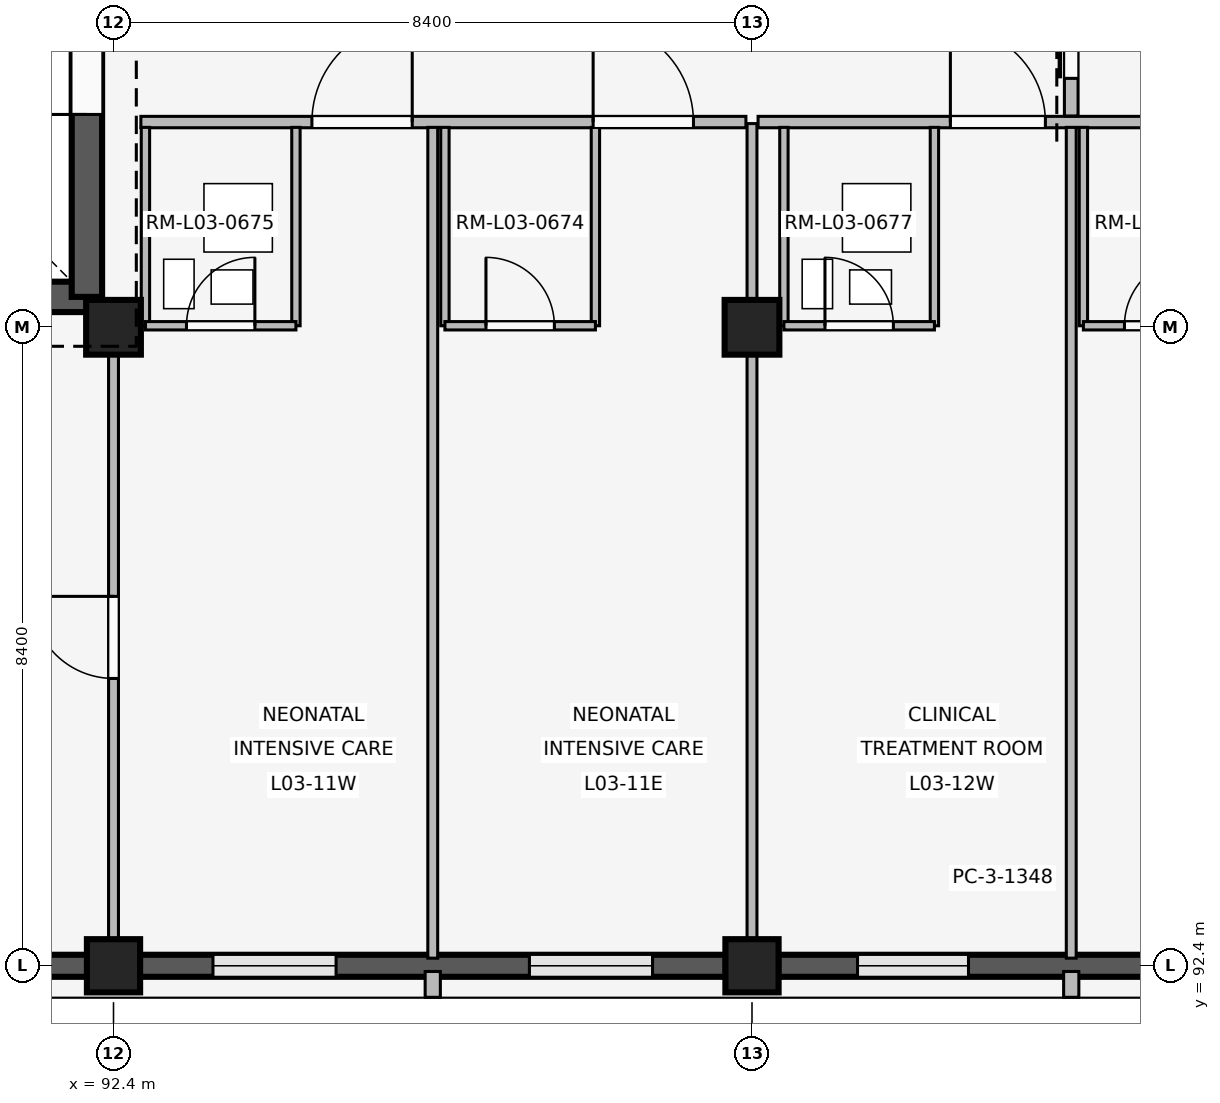
"""IFC4 building model, lengths in metres.
Left out: names, types, materials, properties, quantities, classifications, styles, units other than length and angle.
Written with IfcOpenShell. Run it as: python <this file> out.ifc"""

import sys

from ifc_helpers import new_model, si_unit, direction, frame, frame_2d, origin, origin_2d, place, context, subcontext, project, spatial, rectangle, extrude, element, fill, save


model = new_model("IFC4")
c1 = context("Model", 3, precision=1e-05, world=origin(), true_north=direction((0.0, 1.0)))
c2 = subcontext(c1, "Body", "Model", "MODEL_VIEW")
j1 = project(units=[si_unit("LENGTHUNIT", "METRE"), si_unit("PLANEANGLEUNIT", "RADIAN")], contexts=[c1])
p1 = place(None, origin())
s1 = spatial("IfcSite", under=j1, at=p1, CompositionType="ELEMENT")
p2 = place(p1, origin())
s2 = spatial("IfcBuilding", under=s1, at=p2, CompositionType="ELEMENT")
p3 = place(p2, frame((0.0, 0.0, 12.9)))
s3 = spatial("IfcBuildingStorey", under=s2, at=p3, CompositionType="ELEMENT", Elevation=12.9)
p4 = place(p3, frame((92.4, 92.4, 0.0), z_axis=(0.0, 0.0, 1.0), x_axis=(1.0, 0.0, 0.0)))
e1 = element("IfcColumn", 1, at=p4, inside=s3, PredefinedType="COLUMN", context=c2, shape_type="SweptSolid", body=[
    extrude(rectangle(XDim=0.7, YDim=0.7, at=origin_2d()), origin(), (0.0, 0.0, 1.0), 3.3),
])
p5 = place(p3, frame((92.4, 100.8, 0.0), z_axis=(0.0, 0.0, 1.0), x_axis=(1.0, 0.0, 0.0)))
e2 = element("IfcColumn", 2, at=p5, inside=s3, PredefinedType="COLUMN", context=c2, shape_type="SweptSolid", body=[
    extrude(rectangle(XDim=0.72, YDim=0.72, at=origin_2d()), origin(), (0.0, 0.0, 1.0), 3.3),
])
p6 = place(p3, frame((100.8, 92.4, 0.0), z_axis=(0.0, 0.0, 1.0), x_axis=(1.0, 0.0, 0.0)))
e3 = element("IfcColumn", 3, at=p6, inside=s3, PredefinedType="COLUMN", context=c2, shape_type="SweptSolid", body=[
    extrude(rectangle(XDim=0.7, YDim=0.7, at=origin_2d()), origin(), (0.0, 0.0, 1.0), 3.3),
])
p7 = place(p3, frame((100.8, 100.8, 0.0), z_axis=(0.0, 0.0, 1.0), x_axis=(1.0, 0.0, 0.0)))
e4 = element("IfcColumn", 4, at=p7, inside=s3, PredefinedType="COLUMN", context=c2, shape_type="SweptSolid", body=[
    extrude(rectangle(XDim=0.72, YDim=0.72, at=origin_2d()), origin(), (0.0, 0.0, 1.0), 3.3),
])
p8 = place(p3, frame((92.055, 92.4, 0.0), z_axis=(0.0, 0.0, 1.0), x_axis=(-1.0, 0.0, 0.0)))
e5 = element("IfcWall", 5, at=p8, inside=s3, PredefinedType="SOLIDWALL", context=c2, shape_type="SweptSolid", body=[
    extrude(rectangle(XDim=7.71, YDim=0.29, at=frame_2d((3.855, 0.0))), origin(), (0.0, 0.0, 1.0), 2.44),
])
p9 = place(p8, frame((1.043, 0.0, 0.85)))
e6 = element("IfcOpeningElement", 6, at=p9, cuts=e5, PredefinedType="OPENING", context=c2, shape_type="SweptSolid", body=[
    extrude(rectangle(XDim=1.46, YDim=0.85, at=frame_2d((0.73, 0.425))), frame((0.0, 0.155, 0.0), z_axis=(0.0, -1.0, 0.0), x_axis=(1.0, 0.0, 0.0)), (0.0, 0.0, 1.0), 0.31),
])
p10 = place(p8, frame((5.207, 0.0, 0.85)))
e7 = element("IfcOpeningElement", 7, at=p10, cuts=e5, PredefinedType="OPENING", context=c2, shape_type="SweptSolid", body=[
    extrude(rectangle(XDim=1.46, YDim=0.85, at=frame_2d((0.73, 0.425))), frame((0.0, 0.155, 0.0), z_axis=(0.0, -1.0, 0.0), x_axis=(1.0, 0.0, 0.0)), (0.0, 0.0, 1.0), 0.31),
])
p11 = place(p3, frame((100.455, 92.4, 0.0), z_axis=(0.0, 0.0, 1.0), x_axis=(-1.0, 0.0, 0.0)))
e8 = element("IfcWall", 8, at=p11, inside=s3, PredefinedType="SOLIDWALL", context=c2, shape_type="SweptSolid", body=[
    extrude(rectangle(XDim=7.71, YDim=0.29, at=frame_2d((3.855, 0.0))), origin(), (0.0, 0.0, 1.0), 2.44),
])
p12 = place(p11, frame((0.963, 0.0, 0.85)))
e9 = element("IfcOpeningElement", 9, at=p12, cuts=e8, PredefinedType="OPENING", context=c2, shape_type="SweptSolid", body=[
    extrude(rectangle(XDim=1.62, YDim=0.95, at=frame_2d((0.81, 0.475))), frame((0.0, 0.155, 0.0), z_axis=(0.0, -1.0, 0.0), x_axis=(1.0, 0.0, 0.0)), (0.0, 0.0, 1.0), 0.31),
])
p13 = place(p11, frame((5.127, 0.0, 0.85)))
e10 = element("IfcOpeningElement", 10, at=p13, cuts=e8, PredefinedType="OPENING", context=c2, shape_type="SweptSolid", body=[
    extrude(rectangle(XDim=1.62, YDim=0.95, at=frame_2d((0.81, 0.475))), frame((0.0, 0.155, 0.0), z_axis=(0.0, -1.0, 0.0), x_axis=(1.0, 0.0, 0.0)), (0.0, 0.0, 1.0), 0.31),
])
p14 = place(p3, frame((96.6, 92.325, 0.0), z_axis=(0.0, 0.0, 1.0), x_axis=(0.0, -1.0, 0.0)))
e11 = element("IfcWall", 11, at=p14, inside=s3, PredefinedType="ELEMENTEDWALL", context=c2, shape_type="SweptSolid", body=[
    extrude(rectangle(XDim=0.34, YDim=0.2, at=frame_2d((0.17, 0.0))), origin(), (0.0, 0.0, 1.0), 2.42),
])
p15 = place(p3, frame((108.855, 92.4, 0.0), z_axis=(0.0, 0.0, 1.0), x_axis=(-1.0, 0.0, 0.0)))
e12 = element("IfcWall", 12, at=p15, inside=s3, PredefinedType="SOLIDWALL", context=c2, shape_type="SweptSolid", body=[
    extrude(rectangle(XDim=7.71, YDim=0.29, at=frame_2d((3.855, 0.0))), origin(), (0.0, 0.0, 1.0), 2.44),
])
p16 = place(p15, frame((1.043, 0.0, 0.85)))
e13 = element("IfcOpeningElement", 13, at=p16, cuts=e12, PredefinedType="OPENING", context=c2, shape_type="SweptSolid", body=[
    extrude(rectangle(XDim=1.46, YDim=0.85, at=frame_2d((0.73, 0.425))), frame((0.0, 0.155, 0.0), z_axis=(0.0, -1.0, 0.0), x_axis=(1.0, 0.0, 0.0)), (0.0, 0.0, 1.0), 0.31),
])
p17 = place(p15, frame((5.207, 0.0, 0.85)))
e14 = element("IfcOpeningElement", 14, at=p17, cuts=e12, PredefinedType="OPENING", context=c2, shape_type="SweptSolid", body=[
    extrude(rectangle(XDim=1.46, YDim=0.85, at=frame_2d((0.73, 0.425))), frame((0.0, 0.155, 0.0), z_axis=(0.0, -1.0, 0.0), x_axis=(1.0, 0.0, 0.0)), (0.0, 0.0, 1.0), 0.31),
])
p18 = place(p3, frame((105.0, 92.325, 0.0), z_axis=(0.0, 0.0, 1.0), x_axis=(0.0, -1.0, 0.0)))
e15 = element("IfcWall", 15, at=p18, inside=s3, PredefinedType="ELEMENTEDWALL", context=c2, shape_type="SweptSolid", body=[
    extrude(rectangle(XDim=0.34, YDim=0.2, at=frame_2d((0.17, 0.0))), origin(), (0.0, 0.0, 1.0), 2.42),
])
p19 = place(p3, frame((84.55, 101.2, 0.0), z_axis=(0.0, 0.0, 1.0), x_axis=(1.0, 0.0, 0.0)))
e16 = element("IfcWall", 16, at=p19, inside=s3, PredefinedType="SHEAR", context=c2, shape_type="SweptSolid", body=[
    extrude(rectangle(XDim=7.5, YDim=0.4, at=frame_2d((3.75, 0.0))), origin(), (0.0, 0.0, 1.0), 3.02),
])
p20 = place(p19, frame((4.85, 0.0, 0.0)))
e17 = element("IfcOpeningElement", 17, at=p20, cuts=e16, PredefinedType="OPENING", context=c2, shape_type="SweptSolid", body=[
    extrude(rectangle(XDim=1.2, YDim=2.2, at=frame_2d((0.6, 1.1))), frame((0.0, 0.21, 0.0), z_axis=(0.0, -1.0, 0.0), x_axis=(1.0, 0.0, 0.0)), (0.0, 0.0, 1.0), 0.42),
])
p21 = place(p3, frame((92.05, 101.2, 0.0), z_axis=(0.0, 0.0, 1.0), x_axis=(0.0, 1.0, 0.0)))
e18 = element("IfcWall", 18, at=p21, inside=s3, PredefinedType="SHEAR", context=c2, shape_type="SweptSolid", body=[
    extrude(rectangle(XDim=7.55, YDim=0.4, at=frame_2d((3.775, 0.0))), origin(), (0.0, 0.0, 1.0), 3.02),
])
p22 = place(p21, frame((2.4, 0.0, 0.0)))
e19 = element("IfcOpeningElement", 19, at=p22, cuts=e18, PredefinedType="OPENING", context=c2, shape_type="SweptSolid", body=[
    extrude(rectangle(XDim=1.2, YDim=2.2, at=frame_2d((0.6, 1.1))), frame((0.0, 0.21, 0.0), z_axis=(0.0, -1.0, 0.0), x_axis=(1.0, 0.0, 0.0)), (0.0, 0.0, 1.0), 0.42),
])
p23 = place(p3, frame((92.4, 92.54, 0.0), z_axis=(0.0, 0.0, 1.0), x_axis=(0.0, 1.0, 0.0)))
e20 = element("IfcWall", 20, at=p23, inside=s3, PredefinedType="PARTITIONING", context=c2, shape_type="SweptSolid", body=[
    extrude(rectangle(XDim=8.21, YDim=0.13, at=frame_2d((4.105, 0.0))), origin(), (0.0, 0.0, 1.0), 2.42),
])
p24 = place(p23, frame((3.64, 0.0, 0.0)))
e21 = element("IfcOpeningElement", 21, at=p24, cuts=e20, PredefinedType="OPENING", context=c2, shape_type="SweptSolid", body=[
    extrude(rectangle(XDim=1.08, YDim=2.15, at=frame_2d((0.54, 1.075))), frame((0.0, 0.075, 0.0), z_axis=(0.0, -1.0, 0.0), x_axis=(1.0, 0.0, 0.0)), (0.0, 0.0, 1.0), 0.15),
])
p25 = place(p3, frame((92.76, 103.5, 0.0), z_axis=(0.0, 0.0, 1.0), x_axis=(1.0, 0.0, 0.0)))
e22 = element("IfcWall", 22, at=p25, inside=s3, PredefinedType="PARTITIONING", context=c2, shape_type="SweptSolid", body=[
    extrude(rectangle(XDim=7.96, YDim=0.15, at=frame_2d((3.98, 0.0))), origin(), (0.0, 0.0, 1.0), 2.42),
])
p26 = place(p25, frame((2.25, 0.0, 0.0)))
e23 = element("IfcOpeningElement", 23, at=p26, cuts=e22, PredefinedType="OPENING", context=c2, shape_type="SweptSolid", body=[
    extrude(rectangle(XDim=1.32, YDim=2.25, at=frame_2d((0.66, 1.125))), frame((0.0, 0.085, 0.0), z_axis=(0.0, -1.0, 0.0), x_axis=(1.0, 0.0, 0.0)), (0.0, 0.0, 1.0), 0.17),
])
p27 = place(p25, frame((5.95, 0.0, 0.0)))
e24 = element("IfcOpeningElement", 24, at=p27, cuts=e22, PredefinedType="OPENING", context=c2, shape_type="SweptSolid", body=[
    extrude(rectangle(XDim=1.32, YDim=2.25, at=frame_2d((0.66, 1.125))), frame((0.0, 0.085, 0.0), z_axis=(0.0, -1.0, 0.0), x_axis=(1.0, 0.0, 0.0)), (0.0, 0.0, 1.0), 0.17),
])
p28 = place(p3, frame((96.6, 92.5, 0.0), z_axis=(0.0, 0.0, 1.0), x_axis=(0.0, 1.0, 0.0)))
e25 = element("IfcWall", 25, at=p28, inside=s3, PredefinedType="PARTITIONING", context=c2, shape_type="SweptSolid", body=[
    extrude(rectangle(XDim=10.93, YDim=0.13, at=frame_2d((5.465, 0.0))), origin(), (0.0, 0.0, 1.0), 2.42),
])
for number, where, z_axis, x_axis in (
    (26, (92.82, 100.82, 0.0), (0.0, 0.0, 1.0), (0.0, 1.0, 0.0)),
    (27, (94.8, 100.82, 0.0), (0.0, 0.0, 1.0), (0.0, 1.0, 0.0)),
):
    element("IfcWall", number, at=place(p3, frame(where, z_axis=z_axis, x_axis=x_axis)), inside=s3, PredefinedType="PARTITIONING", context=c2, shape_type="SweptSolid", body=[
        extrude(rectangle(XDim=2.61, YDim=0.11, at=frame_2d((1.305, 0.0))), origin(), (0.0, 0.0, 1.0), 2.42),
    ])
p29 = place(p3, frame((92.82, 100.82, 0.0), z_axis=(0.0, 0.0, 1.0), x_axis=(1.0, 0.0, 0.0)))
e28 = element("IfcWall", 28, at=p29, inside=s3, PredefinedType="PARTITIONING", context=c2, shape_type="SweptSolid", body=[
    extrude(rectangle(XDim=1.98, YDim=0.11, at=frame_2d((0.99, 0.0))), origin(), (0.0, 0.0, 1.0), 2.42),
])
p30 = place(p29, frame((0.54, 0.0, 0.0)))
e29 = element("IfcOpeningElement", 29, at=p30, cuts=e28, PredefinedType="OPENING", context=c2, shape_type="SweptSolid", body=[
    extrude(rectangle(XDim=0.9, YDim=2.1, at=frame_2d((0.45, 1.05))), frame((0.0, 0.065, 0.0), z_axis=(0.0, -1.0, 0.0), x_axis=(1.0, 0.0, 0.0)), (0.0, 0.0, 1.0), 0.13),
])
for number, where, z_axis, x_axis in (
    (30, (96.76, 100.82, 0.0), (0.0, 0.0, 1.0), (0.0, 1.0, 0.0)),
    (31, (98.74, 100.82, 0.0), (0.0, 0.0, 1.0), (0.0, 1.0, 0.0)),
):
    element("IfcWall", number, at=place(p3, frame(where, z_axis=z_axis, x_axis=x_axis)), inside=s3, PredefinedType="PARTITIONING", context=c2, shape_type="SweptSolid", body=[
        extrude(rectangle(XDim=2.61, YDim=0.11, at=frame_2d((1.305, 0.0))), origin(), (0.0, 0.0, 1.0), 2.42),
    ])
p31 = place(p3, frame((96.76, 100.82, 0.0), z_axis=(0.0, 0.0, 1.0), x_axis=(1.0, 0.0, 0.0)))
e32 = element("IfcWall", 32, at=p31, inside=s3, PredefinedType="PARTITIONING", context=c2, shape_type="SweptSolid", body=[
    extrude(rectangle(XDim=1.98, YDim=0.11, at=frame_2d((0.99, 0.0))), origin(), (0.0, 0.0, 1.0), 2.42),
])
p32 = place(p31, frame((0.54, 0.0, 0.0)))
e33 = element("IfcOpeningElement", 33, at=p32, cuts=e32, PredefinedType="OPENING", context=c2, shape_type="SweptSolid", body=[
    extrude(rectangle(XDim=0.9, YDim=2.1, at=frame_2d((0.45, 1.05))), frame((0.0, 0.065, 0.0), z_axis=(0.0, -1.0, 0.0), x_axis=(1.0, 0.0, 0.0)), (0.0, 0.0, 1.0), 0.13),
])
p33 = place(p3, frame((100.8, 92.54, 0.0), z_axis=(0.0, 0.0, 1.0), x_axis=(0.0, 1.0, 0.0)))
e34 = element("IfcWall", 34, at=p33, inside=s3, PredefinedType="PARTITIONING", context=c2, shape_type="SweptSolid", body=[
    extrude(rectangle(XDim=10.94, YDim=0.13, at=frame_2d((5.47, 0.0))), origin(), (0.0, 0.0, 1.0), 2.42),
])
p34 = place(p3, frame((100.88, 103.5, 0.0), z_axis=(0.0, 0.0, 1.0), x_axis=(1.0, 0.0, 0.0)))
e35 = element("IfcWall", 35, at=p34, inside=s3, PredefinedType="PARTITIONING", context=c2, shape_type="SweptSolid", body=[
    extrude(rectangle(XDim=8.24, YDim=0.15, at=frame_2d((4.12, 0.0))), origin(), (0.0, 0.0, 1.0), 2.42),
])
p35 = place(p34, frame((2.53, 0.0, 0.0)))
e36 = element("IfcOpeningElement", 36, at=p35, cuts=e35, PredefinedType="OPENING", context=c2, shape_type="SweptSolid", body=[
    extrude(rectangle(XDim=1.25, YDim=2.2, at=frame_2d((0.625, 1.1))), frame((0.0, 0.085, 0.0), z_axis=(0.0, -1.0, 0.0), x_axis=(1.0, 0.0, 0.0)), (0.0, 0.0, 1.0), 0.17),
])
p36 = place(p34, frame((6.23, 0.0, 0.0)))
e37 = element("IfcOpeningElement", 37, at=p36, cuts=e35, PredefinedType="OPENING", context=c2, shape_type="SweptSolid", body=[
    extrude(rectangle(XDim=1.25, YDim=2.2, at=frame_2d((0.625, 1.1))), frame((0.0, 0.085, 0.0), z_axis=(0.0, -1.0, 0.0), x_axis=(1.0, 0.0, 0.0)), (0.0, 0.0, 1.0), 0.17),
])
p37 = place(p3, frame((105.0, 92.5, 0.0), z_axis=(0.0, 0.0, 1.0), x_axis=(0.0, 1.0, 0.0)))
e38 = element("IfcWall", 38, at=p37, inside=s3, PredefinedType="PARTITIONING", context=c2, shape_type="SweptSolid", body=[
    extrude(rectangle(XDim=10.93, YDim=0.13, at=frame_2d((5.465, 0.0))), origin(), (0.0, 0.0, 1.0), 2.42),
])
for number, where, z_axis, x_axis in (
    (39, (101.22, 100.82, 0.0), (0.0, 0.0, 1.0), (0.0, 1.0, 0.0)),
    (40, (103.2, 100.82, 0.0), (0.0, 0.0, 1.0), (0.0, 1.0, 0.0)),
):
    element("IfcWall", number, at=place(p3, frame(where, z_axis=z_axis, x_axis=x_axis)), inside=s3, PredefinedType="PARTITIONING", context=c2, shape_type="SweptSolid", body=[
        extrude(rectangle(XDim=2.61, YDim=0.11, at=frame_2d((1.305, 0.0))), origin(), (0.0, 0.0, 1.0), 2.42),
    ])
p38 = place(p3, frame((101.22, 100.82, 0.0), z_axis=(0.0, 0.0, 1.0), x_axis=(1.0, 0.0, 0.0)))
e41 = element("IfcWall", 41, at=p38, inside=s3, PredefinedType="PARTITIONING", context=c2, shape_type="SweptSolid", body=[
    extrude(rectangle(XDim=1.98, YDim=0.11, at=frame_2d((0.99, 0.0))), origin(), (0.0, 0.0, 1.0), 2.42),
])
p39 = place(p38, frame((0.54, 0.0, 0.0)))
e42 = element("IfcOpeningElement", 42, at=p39, cuts=e41, PredefinedType="OPENING", context=c2, shape_type="SweptSolid", body=[
    extrude(rectangle(XDim=0.9, YDim=2.1, at=frame_2d((0.45, 1.05))), frame((0.0, 0.065, 0.0), z_axis=(0.0, -1.0, 0.0), x_axis=(1.0, 0.0, 0.0)), (0.0, 0.0, 1.0), 0.13),
])
p40 = place(p3, frame((105.16, 100.82, 0.0), z_axis=(0.0, 0.0, 1.0), x_axis=(0.0, 1.0, 0.0)))
e43 = element("IfcWall", 43, at=p40, inside=s3, PredefinedType="PARTITIONING", context=c2, shape_type="SweptSolid", body=[
    extrude(rectangle(XDim=2.61, YDim=0.11, at=frame_2d((1.305, 0.0))), origin(), (0.0, 0.0, 1.0), 2.42),
])
p41 = place(p3, frame((105.16, 100.82, 0.0), z_axis=(0.0, 0.0, 1.0), x_axis=(1.0, 0.0, 0.0)))
e44 = element("IfcWall", 44, at=p41, inside=s3, PredefinedType="PARTITIONING", context=c2, shape_type="SweptSolid", body=[
    extrude(rectangle(XDim=1.98, YDim=0.11, at=frame_2d((0.99, 0.0))), origin(), (0.0, 0.0, 1.0), 2.42),
])
p42 = place(p41, frame((0.54, 0.0, 0.0)))
e45 = element("IfcOpeningElement", 45, at=p42, cuts=e44, PredefinedType="OPENING", context=c2, shape_type="SweptSolid", body=[
    extrude(rectangle(XDim=0.9, YDim=2.1, at=frame_2d((0.45, 1.05))), frame((0.0, 0.065, 0.0), z_axis=(0.0, -1.0, 0.0), x_axis=(1.0, 0.0, 0.0)), (0.0, 0.0, 1.0), 0.13),
])
p43 = place(p3, frame((103.65, 93.55, 0.0), z_axis=(0.0, 0.0, 1.0), x_axis=(1.0, 0.0, 0.0)))
e46 = element("IfcWall", 46, at=p43, inside=s3, PredefinedType="PLUMBINGWALL", context=c2, shape_type="SweptSolid", body=[
    extrude(rectangle(XDim=0.9, YDim=0.24, at=frame_2d((0.45, 0.0))), origin(), (0.0, 0.0, 1.0), 2.42),
])
p44 = place(p3, frame((105.0, 103.58, 0.0), z_axis=(0.0, 0.0, 1.0), x_axis=(0.0, 1.0, 0.0)))
e47 = element("IfcWall", 47, at=p44, inside=s3, PredefinedType="PARTITIONING", context=c2, shape_type="SweptSolid", body=[
    extrude(rectangle(XDim=2.84, YDim=0.18, at=frame_2d((1.42, 0.0))), origin(), (0.0, 0.0, 1.0), 2.42),
])
p45 = place(p44, frame((0.495, 0.0, 0.0)))
e48 = element("IfcOpeningElement", 48, at=p45, cuts=e47, PredefinedType="OPENING", context=c2, shape_type="SweptSolid", body=[
    extrude(rectangle(XDim=1.85, YDim=2.3, at=frame_2d((0.925, 1.15))), frame((0.0, 0.1, 0.0), z_axis=(0.0, -1.0, 0.0), x_axis=(1.0, 0.0, 0.0)), (0.0, 0.0, 1.0), 0.2),
])
p46 = place(p12, origin())
e49 = element("IfcWindow", 49, at=p46, inside=s3, PartitioningType="SINGLE_PANEL", PredefinedType="WINDOW", context=c2, shape_type="SweptSolid", body=[
    extrude(rectangle(XDim=1.62, YDim=0.95, at=frame_2d((0.81, 0.475))), frame((0.0, 0.03, 0.0), z_axis=(0.0, -1.0, 0.0), x_axis=(1.0, 0.0, 0.0)), (0.0, 0.0, 1.0), 0.06),
])
fill(e9, e49)
p47 = place(p13, origin())
e50 = element("IfcWindow", 50, at=p47, inside=s3, PartitioningType="SINGLE_PANEL", PredefinedType="WINDOW", context=c2, shape_type="SweptSolid", body=[
    extrude(rectangle(XDim=1.62, YDim=0.95, at=frame_2d((0.81, 0.475))), frame((0.0, 0.03, 0.0), z_axis=(0.0, -1.0, 0.0), x_axis=(1.0, 0.0, 0.0)), (0.0, 0.0, 1.0), 0.06),
])
fill(e10, e50)
p48 = place(p17, origin())
e51 = element("IfcWindow", 51, at=p48, inside=s3, PartitioningType="SINGLE_PANEL", PredefinedType="WINDOW", context=c2, shape_type="SweptSolid", body=[
    extrude(rectangle(XDim=1.46, YDim=0.85, at=frame_2d((0.73, 0.425))), frame((0.0, 0.03, 0.0), z_axis=(0.0, -1.0, 0.0), x_axis=(1.0, 0.0, 0.0)), (0.0, 0.0, 1.0), 0.06),
])
fill(e14, e51)
p49 = place(p22, origin())
e52 = element("IfcDoor", 52, at=p49, inside=s3, OperationType="SINGLE_SWING_LEFT", PredefinedType="DOOR", context=c2, shape_type="SweptSolid", body=[
    extrude(rectangle(XDim=1.2, YDim=2.2, at=frame_2d((0.6, 1.1))), frame((0.0, 0.025, 0.0), z_axis=(0.0, -1.0, 0.0), x_axis=(1.0, 0.0, 0.0)), (0.0, 0.0, 1.0), 0.05),
])
fill(e19, e52)
p50 = place(p24, origin())
e53 = element("IfcDoor", 53, at=p50, inside=s3, OperationType="SINGLE_SWING_RIGHT", PredefinedType="DOOR", context=c2, shape_type="SweptSolid", body=[
    extrude(rectangle(XDim=1.08, YDim=2.15, at=frame_2d((0.54, 1.075))), frame((0.0, 0.025, 0.0), z_axis=(0.0, -1.0, 0.0), x_axis=(1.0, 0.0, 0.0)), (0.0, 0.0, 1.0), 0.05),
])
fill(e21, e53)
p51 = place(p26, origin())
e54 = element("IfcDoor", 54, at=p51, inside=s3, OperationType="SINGLE_SWING_RIGHT", PredefinedType="DOOR", context=c2, shape_type="SweptSolid", body=[
    extrude(rectangle(XDim=1.32, YDim=2.25, at=frame_2d((0.66, 1.125))), frame((0.0, 0.025, 0.0), z_axis=(0.0, -1.0, 0.0), x_axis=(1.0, 0.0, 0.0)), (0.0, 0.0, 1.0), 0.05),
])
fill(e23, e54)
p52 = place(p27, origin())
e55 = element("IfcDoor", 55, at=p52, inside=s3, OperationType="SINGLE_SWING_LEFT", PredefinedType="DOOR", context=c2, shape_type="SweptSolid", body=[
    extrude(rectangle(XDim=1.32, YDim=2.25, at=frame_2d((0.66, 1.125))), frame((0.0, 0.025, 0.0), z_axis=(0.0, -1.0, 0.0), x_axis=(1.0, 0.0, 0.0)), (0.0, 0.0, 1.0), 0.05),
])
fill(e24, e55)
p53 = place(p30, origin())
e56 = element("IfcDoor", 56, at=p53, inside=s3, OperationType="SINGLE_SWING_RIGHT", PredefinedType="DOOR", context=c2, shape_type="SweptSolid", body=[
    extrude(rectangle(XDim=0.9, YDim=2.1, at=frame_2d((0.45, 1.05))), frame((0.0, 0.025, 0.0), z_axis=(0.0, -1.0, 0.0), x_axis=(1.0, 0.0, 0.0)), (0.0, 0.0, 1.0), 0.05),
])
fill(e29, e56)
p54 = place(p32, origin())
e57 = element("IfcDoor", 57, at=p54, inside=s3, OperationType="SINGLE_SWING_LEFT", PredefinedType="DOOR", context=c2, shape_type="SweptSolid", body=[
    extrude(rectangle(XDim=0.9, YDim=2.1, at=frame_2d((0.45, 1.05))), frame((0.0, 0.025, 0.0), z_axis=(0.0, -1.0, 0.0), x_axis=(1.0, 0.0, 0.0)), (0.0, 0.0, 1.0), 0.05),
])
fill(e33, e57)
p55 = place(p35, origin())
e58 = element("IfcDoor", 58, at=p55, inside=s3, OperationType="SINGLE_SWING_LEFT", PredefinedType="DOOR", context=c2, shape_type="SweptSolid", body=[
    extrude(rectangle(XDim=1.25, YDim=2.2, at=frame_2d((0.625, 1.1))), frame((0.0, 0.025, 0.0), z_axis=(0.0, -1.0, 0.0), x_axis=(1.0, 0.0, 0.0)), (0.0, 0.0, 1.0), 0.05),
])
fill(e36, e58)
p56 = place(p39, origin())
e59 = element("IfcDoor", 59, at=p56, inside=s3, OperationType="SINGLE_SWING_LEFT", PredefinedType="DOOR", context=c2, shape_type="SweptSolid", body=[
    extrude(rectangle(XDim=0.9, YDim=2.1, at=frame_2d((0.45, 1.05))), frame((0.0, 0.025, 0.0), z_axis=(0.0, -1.0, 0.0), x_axis=(1.0, 0.0, 0.0)), (0.0, 0.0, 1.0), 0.05),
])
fill(e42, e59)
p57 = place(p42, origin())
e60 = element("IfcDoor", 60, at=p57, inside=s3, OperationType="SINGLE_SWING_RIGHT", PredefinedType="DOOR", context=c2, shape_type="SweptSolid", body=[
    extrude(rectangle(XDim=0.9, YDim=2.1, at=frame_2d((0.45, 1.05))), frame((0.0, 0.025, 0.0), z_axis=(0.0, -1.0, 0.0), x_axis=(1.0, 0.0, 0.0)), (0.0, 0.0, 1.0), 0.05),
])
fill(e45, e60)
p58 = place(p45, origin())
e61 = element("IfcDoor", 61, at=p58, inside=s3, OperationType="SLIDING_TO_LEFT", PredefinedType="DOOR", context=c2, shape_type="SweptSolid", body=[
    extrude(rectangle(XDim=1.85, YDim=2.3, at=frame_2d((0.925, 1.15))), frame((0.0, 0.025, 0.0), z_axis=(0.0, -1.0, 0.0), x_axis=(1.0, 0.0, 0.0)), (0.0, 0.0, 1.0), 0.05),
])
fill(e48, e61)
save(model, sys.argv[1])
